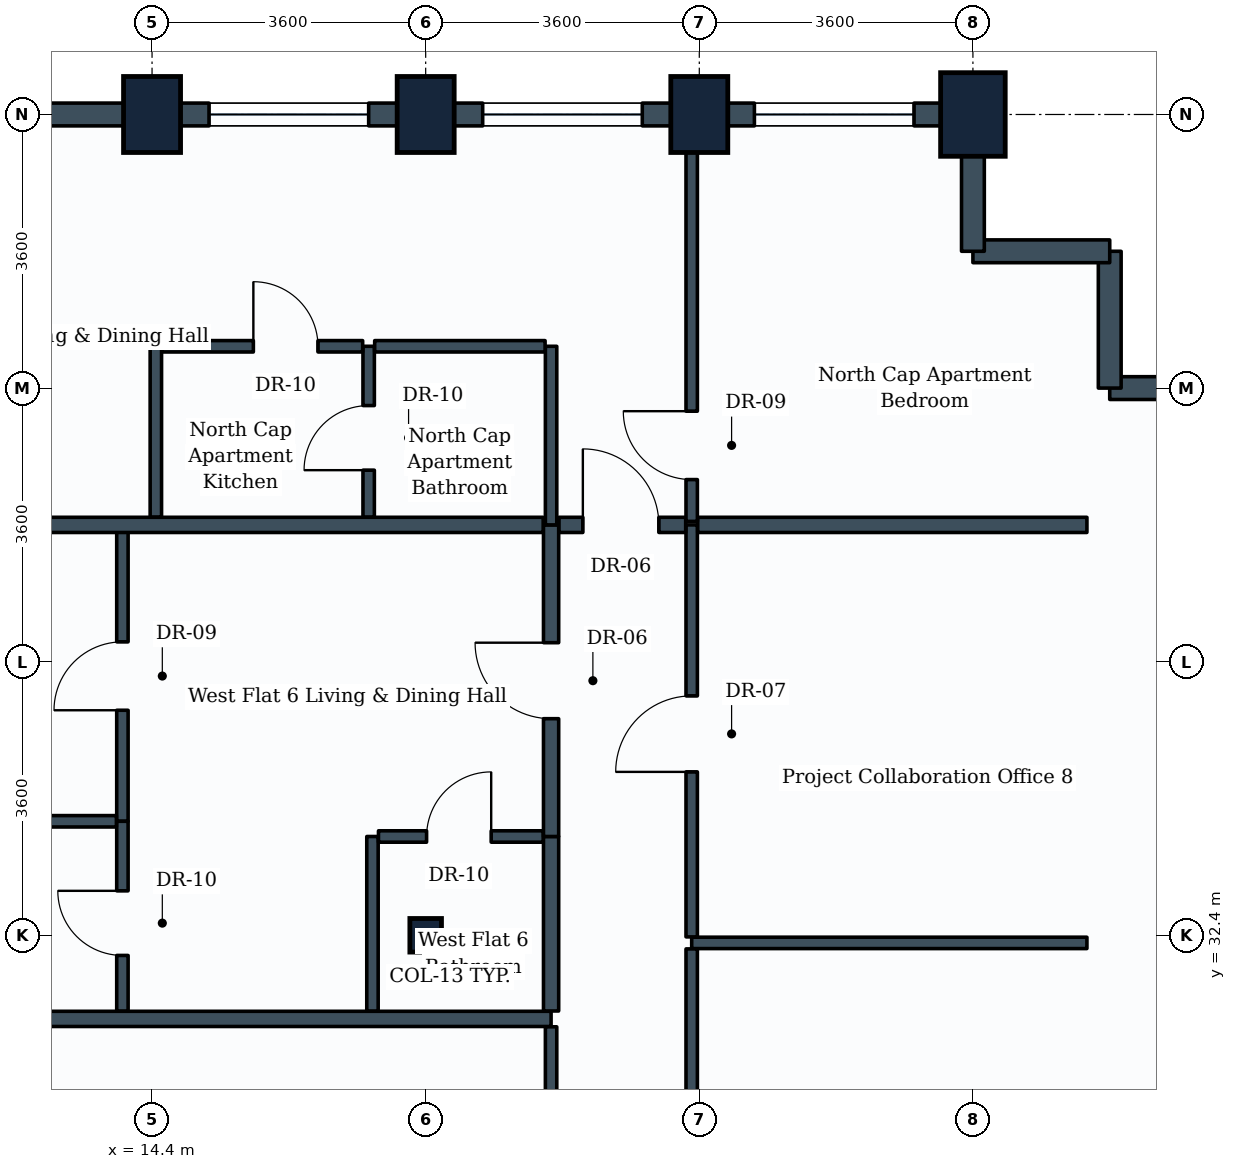
"""IFC4 building model, lengths in metres.
Left out: names, types, materials, properties, quantities, classifications, styles, units other than length and angle.
Written with IfcOpenShell. Run it as: python <this file> out.ifc"""

import sys

from ifc_helpers import new_model, si_unit, direction, frame, frame_2d, origin, origin_2d, place, context, subcontext, project, spatial, rectangle, i_section, extrude, element, fill, save


model = new_model("IFC4")
c1 = context("Model", 3, precision=1e-05, world=origin(), true_north=direction((0.0, 1.0)))
c2 = subcontext(c1, "Body", "Model", "MODEL_VIEW")
j1 = project(units=[si_unit("LENGTHUNIT", "METRE"), si_unit("PLANEANGLEUNIT", "RADIAN")], contexts=[c1])
p1 = place(None, origin())
s1 = spatial("IfcSite", under=j1, at=p1, CompositionType="ELEMENT")
p2 = place(p1, origin())
s2 = spatial("IfcBuilding", under=s1, at=p2, CompositionType="ELEMENT")
p3 = place(p2, frame((0.0, 0.0, 146.6)))
s3 = spatial("IfcBuildingStorey", under=s2, at=p3, CompositionType="ELEMENT", Elevation=146.6)
p4 = place(p3, frame((14.4, 43.2, 0.0), z_axis=(0.0, 0.0, 1.0), x_axis=(1.0, 0.0, 0.0)))
e1 = element("IfcColumn", 1, at=p4, inside=s3, PredefinedType="COLUMN", context=c2, shape_type="SweptSolid", body=[
    extrude(rectangle(XDim=0.75, YDim=1.0, at=origin_2d()), origin(), (0.0, 0.0, 1.0), 3.8),
])
p5 = place(p3, frame((18.0, 32.4, 0.0), z_axis=(0.0, 0.0, 1.0), x_axis=(1.0, 0.0, 0.0)))
e2 = element("IfcColumn", 2, at=p5, inside=s3, PredefinedType="COLUMN", context=c2, shape_type="SweptSolid", body=[
    extrude(i_section(OverallWidth=0.416, OverallDepth=0.442, WebThickness=0.025, FlangeThickness=0.041, FilletRadius=0.015, at=origin_2d()), origin(), (0.0, 0.0, 1.0), 3.8),
])
for number, where, z_axis, x_axis in (
    (3, (18.0, 43.2, 0.0), (0.0, 0.0, 1.0), (1.0, 0.0, 0.0)),
    (4, (21.6, 43.2, 0.0), (0.0, 0.0, 1.0), (1.0, 0.0, 0.0)),
):
    element("IfcColumn", number, at=place(p3, frame(where, z_axis=z_axis, x_axis=x_axis)), inside=s3, PredefinedType="COLUMN", context=c2, shape_type="SweptSolid", body=[
        extrude(rectangle(XDim=0.75, YDim=1.0, at=origin_2d()), origin(), (0.0, 0.0, 1.0), 3.8),
    ])
p6 = place(p3, frame((25.2, 43.2, 0.0), z_axis=(0.0, 0.0, 1.0), x_axis=(1.0, 0.0, 0.0)))
e5 = element("IfcColumn", 5, at=p6, inside=s3, PredefinedType="COLUMN", context=c2, shape_type="SweptSolid", body=[
    extrude(rectangle(XDim=0.85, YDim=1.1, at=origin_2d()), origin(), (0.0, 0.0, 1.0), 3.8),
])
p7 = place(p3, frame((27.0, 39.6, 0.0), z_axis=(0.0, 0.0, 1.0), x_axis=(1.0, 0.0, 0.0)))
e6 = element("IfcWall", 6, at=p7, inside=s3, PredefinedType="STANDARD", context=c2, shape_type="SweptSolid", body=[
    extrude(rectangle(XDim=1.8, YDim=0.3, at=frame_2d((0.9, 0.0))), origin(), (0.0, 0.0, 1.0), 2.93),
])
p8 = place(p3, frame((27.0, 39.6, 0.0), z_axis=(0.0, 0.0, 1.0), x_axis=(0.0, 1.0, 0.0)))
e7 = element("IfcWall", 7, at=p8, inside=s3, PredefinedType="STANDARD", context=c2, shape_type="SweptSolid", body=[
    extrude(rectangle(XDim=1.8, YDim=0.3, at=frame_2d((0.9, 0.0))), origin(), (0.0, 0.0, 1.0), 3.535),
])
p9 = place(p3, frame((25.2, 41.4, 0.0), z_axis=(0.0, 0.0, 1.0), x_axis=(1.0, 0.0, 0.0)))
e8 = element("IfcWall", 8, at=p9, inside=s3, PredefinedType="STANDARD", context=c2, shape_type="SweptSolid", body=[
    extrude(rectangle(XDim=1.8, YDim=0.3, at=frame_2d((0.9, 0.0))), origin(), (0.0, 0.0, 1.0), 3.535),
])
p10 = place(p3, frame((25.2, 41.4, 0.0), z_axis=(0.0, 0.0, 1.0), x_axis=(0.0, 1.0, 0.0)))
e9 = element("IfcWall", 9, at=p10, inside=s3, PredefinedType="STANDARD", context=c2, shape_type="SweptSolid", body=[
    extrude(rectangle(XDim=1.8, YDim=0.3, at=frame_2d((0.9, 0.0))), origin(), (0.0, 0.0, 1.0), 2.93),
])
p11 = place(p3, frame((21.6, 43.2, 0.0), z_axis=(0.0, 0.0, 1.0), x_axis=(1.0, 0.0, 0.0)))
e10 = element("IfcWall", 10, at=p11, inside=s3, PredefinedType="STANDARD", context=c2, shape_type="SweptSolid", body=[
    extrude(rectangle(XDim=3.6, YDim=0.3, at=frame_2d((1.8, 0.0))), origin(), (0.0, 0.0, 1.0), 2.93),
])
p12 = place(p11, frame((0.725, 0.0, 0.85)))
e11 = element("IfcOpeningElement", 11, at=p12, cuts=e10, PredefinedType="OPENING", context=c2, shape_type="SweptSolid", body=[
    extrude(rectangle(XDim=2.1, YDim=1.35, at=frame_2d((1.05, 0.675))), frame((0.0, 0.16, 0.0), z_axis=(0.0, -1.0, 0.0), x_axis=(1.0, 0.0, 0.0)), (0.0, 0.0, 1.0), 0.32),
])
p13 = place(p3, frame((18.0, 43.2, 0.0), z_axis=(0.0, 0.0, 1.0), x_axis=(1.0, 0.0, 0.0)))
e12 = element("IfcWall", 12, at=p13, inside=s3, PredefinedType="STANDARD", context=c2, shape_type="SweptSolid", body=[
    extrude(rectangle(XDim=3.6, YDim=0.3, at=frame_2d((1.8, 0.0))), origin(), (0.0, 0.0, 1.0), 2.93),
])
p14 = place(p13, frame((0.75, 0.0, 0.85)))
e13 = element("IfcOpeningElement", 13, at=p14, cuts=e12, PredefinedType="OPENING", context=c2, shape_type="SweptSolid", body=[
    extrude(rectangle(XDim=2.1, YDim=1.35, at=frame_2d((1.05, 0.675))), frame((0.0, 0.16, 0.0), z_axis=(0.0, -1.0, 0.0), x_axis=(1.0, 0.0, 0.0)), (0.0, 0.0, 1.0), 0.32),
])
p15 = place(p3, frame((14.4, 43.2, 0.0), z_axis=(0.0, 0.0, 1.0), x_axis=(1.0, 0.0, 0.0)))
e14 = element("IfcWall", 14, at=p15, inside=s3, PredefinedType="STANDARD", context=c2, shape_type="SweptSolid", body=[
    extrude(rectangle(XDim=3.6, YDim=0.3, at=frame_2d((1.8, 0.0))), origin(), (0.0, 0.0, 1.0), 2.93),
])
p16 = place(p15, frame((0.75, 0.0, 0.85)))
e15 = element("IfcOpeningElement", 15, at=p16, cuts=e14, PredefinedType="OPENING", context=c2, shape_type="SweptSolid", body=[
    extrude(rectangle(XDim=2.1, YDim=1.35, at=frame_2d((1.05, 0.675))), frame((0.0, 0.16, 0.0), z_axis=(0.0, -1.0, 0.0), x_axis=(1.0, 0.0, 0.0)), (0.0, 0.0, 1.0), 0.32),
])
p17 = place(p3, frame((10.8, 43.2, 0.0), z_axis=(0.0, 0.0, 1.0), x_axis=(1.0, 0.0, 0.0)))
e16 = element("IfcWall", 16, at=p17, inside=s3, PredefinedType="STANDARD", context=c2, shape_type="SweptSolid", body=[
    extrude(rectangle(XDim=3.6, YDim=0.3, at=frame_2d((1.8, 0.0))), origin(), (0.0, 0.0, 1.0), 2.93),
])
p18 = place(p3, frame((7.354, 31.3, 0.0), z_axis=(0.0, 0.0, 1.0), x_axis=(1.0, 0.0, 0.0)))
e17 = element("IfcWall", 17, at=p18, inside=s3, PredefinedType="PARTITIONING", context=c2, shape_type="SweptSolid", body=[
    extrude(rectangle(XDim=12.296, YDim=0.2, at=frame_2d((6.148, 0.0))), origin(), (0.0, 0.0, 1.0), 2.93),
])
p19 = place(p3, frame((19.65, 26.904, 0.0), z_axis=(0.0, 0.0, 1.0), x_axis=(0.0, 1.0, 0.0)))
e18 = element("IfcWall", 18, at=p19, inside=s3, PredefinedType="PARTITIONING", context=c2, shape_type="SweptSolid", body=[
    extrude(rectangle(XDim=4.292, YDim=0.15, at=frame_2d((2.146, 0.0))), origin(), (0.0, 0.0, 1.0), 3.17),
])
p20 = place(p19, frame((1.606, 0.0, 0.0)))
e19 = element("IfcOpeningElement", 19, at=p20, cuts=e18, PredefinedType="OPENING", context=c2, shape_type="SweptSolid", body=[
    extrude(rectangle(XDim=1.0, YDim=2.1, at=frame_2d((0.5, 1.05))), frame((0.0, 0.085, 0.0), z_axis=(0.0, -1.0, 0.0), x_axis=(1.0, 0.0, 0.0)), (0.0, 0.0, 1.0), 0.17),
])
p21 = place(p3, frame((19.65, 31.404, 0.0), z_axis=(0.0, 0.0, 1.0), x_axis=(0.0, 1.0, 0.0)))
e20 = element("IfcWall", 20, at=p21, inside=s3, PredefinedType="PARTITIONING", context=c2, shape_type="SweptSolid", body=[
    extrude(rectangle(XDim=2.296, YDim=0.2, at=frame_2d((1.148, 0.0))), origin(), (0.0, 0.0, 1.0), 3.18),
])
p22 = place(p3, frame((17.3, 31.404, 0.0), z_axis=(0.0, 0.0, 1.0), x_axis=(0.0, 1.0, 0.0)))
e21 = element("IfcWall", 21, at=p22, inside=s3, PredefinedType="PARTITIONING", context=c2, shape_type="SweptSolid", body=[
    extrude(rectangle(XDim=2.296, YDim=0.15, at=frame_2d((1.148, 0.0))), origin(), (0.0, 0.0, 1.0), 3.18),
])
p23 = place(p3, frame((17.379, 33.7, 0.0), z_axis=(0.0, 0.0, 1.0), x_axis=(1.0, 0.0, 0.0)))
e22 = element("IfcWall", 22, at=p23, inside=s3, PredefinedType="PARTITIONING", context=c2, shape_type="SweptSolid", body=[
    extrude(rectangle(XDim=2.167, YDim=0.15, at=frame_2d((1.083, 0.0))), origin(), (0.0, 0.0, 1.0), 3.17),
])
p24 = place(p23, frame((0.633, 0.0, 0.0)))
e23 = element("IfcOpeningElement", 23, at=p24, cuts=e22, PredefinedType="OPENING", context=c2, shape_type="SweptSolid", body=[
    extrude(rectangle(XDim=0.85, YDim=2.1, at=frame_2d((0.425, 1.05))), frame((0.0, 0.085, 0.0), z_axis=(0.0, -1.0, 0.0), x_axis=(1.0, 0.0, 0.0)), (0.0, 0.0, 1.0), 0.17),
])
p25 = place(p3, frame((19.65, 33.7, 0.0), z_axis=(0.0, 0.0, 1.0), x_axis=(0.0, 1.0, 0.0)))
e24 = element("IfcWall", 24, at=p25, inside=s3, PredefinedType="PARTITIONING", context=c2, shape_type="SweptSolid", body=[
    extrude(rectangle(XDim=4.1, YDim=0.2, at=frame_2d((2.05, 0.0))), origin(), (0.0, 0.0, 1.0), 3.17),
])
p26 = place(p25, frame((1.55, 0.0, 0.0)))
e25 = element("IfcOpeningElement", 25, at=p26, cuts=e24, PredefinedType="OPENING", context=c2, shape_type="SweptSolid", body=[
    extrude(rectangle(XDim=1.0, YDim=2.1, at=frame_2d((0.5, 1.05))), frame((0.0, 0.11, 0.0), z_axis=(0.0, -1.0, 0.0), x_axis=(1.0, 0.0, 0.0)), (0.0, 0.0, 1.0), 0.22),
])
p27 = place(p3, frame((14.01, 33.9, 0.0), z_axis=(0.0, 0.0, 1.0), x_axis=(0.0, 1.0, 0.0)))
e26 = element("IfcWall", 26, at=p27, inside=s3, PredefinedType="PARTITIONING", context=c2, shape_type="SweptSolid", body=[
    extrude(rectangle(XDim=3.9, YDim=0.15, at=frame_2d((1.95, 0.0))), origin(), (0.0, 0.0, 1.0), 3.17),
])
p28 = place(p27, frame((1.461, 0.0, 0.0)))
e27 = element("IfcOpeningElement", 27, at=p28, cuts=e26, PredefinedType="OPENING", context=c2, shape_type="SweptSolid", body=[
    extrude(rectangle(XDim=0.9, YDim=2.1, at=frame_2d((0.45, 1.05))), frame((0.0, 0.085, 0.0), z_axis=(0.0, -1.0, 0.0), x_axis=(1.0, 0.0, 0.0)), (0.0, 0.0, 1.0), 0.17),
])
p29 = place(p3, frame((14.01, 31.404, 0.0), z_axis=(0.0, 0.0, 1.0), x_axis=(0.0, 1.0, 0.0)))
e28 = element("IfcWall", 28, at=p29, inside=s3, PredefinedType="PARTITIONING", context=c2, shape_type="SweptSolid", body=[
    extrude(rectangle(XDim=2.496, YDim=0.15, at=frame_2d((1.248, 0.0))), origin(), (0.0, 0.0, 1.0), 3.18),
])
p30 = place(p29, frame((0.731, 0.0, 0.0)))
e29 = element("IfcOpeningElement", 29, at=p30, cuts=e28, PredefinedType="OPENING", context=c2, shape_type="SweptSolid", body=[
    extrude(rectangle(XDim=0.85, YDim=2.1, at=frame_2d((0.425, 1.05))), frame((0.0, 0.085, 0.0), z_axis=(0.0, -1.0, 0.0), x_axis=(1.0, 0.0, 0.0)), (0.0, 0.0, 1.0), 0.17),
])
p31 = place(p3, frame((7.354, 33.9, 0.0), z_axis=(0.0, 0.0, 1.0), x_axis=(1.0, 0.0, 0.0)))
e30 = element("IfcWall", 30, at=p31, inside=s3, PredefinedType="PARTITIONING", context=c2, shape_type="SweptSolid", body=[
    extrude(rectangle(XDim=6.577, YDim=0.15, at=frame_2d((3.289, 0.0))), origin(), (0.0, 0.0, 1.0), 2.93),
])
p32 = place(p3, frame((21.5, 32.3, 0.0), z_axis=(0.0, 0.0, 1.0), x_axis=(1.0, 0.0, 0.0)))
e31 = element("IfcWall", 31, at=p32, inside=s3, PredefinedType="PARTITIONING", context=c2, shape_type="SweptSolid", body=[
    extrude(rectangle(XDim=5.2, YDim=0.15, at=frame_2d((2.6, 0.0))), origin(), (0.0, 0.0, 1.0), 3.18),
])
p33 = place(p3, frame((21.5, 26.879, 0.0), z_axis=(0.0, 0.0, 1.0), x_axis=(0.0, 1.0, 0.0)))
e32 = element("IfcWall", 32, at=p33, inside=s3, PredefinedType="PARTITIONING", context=c2, shape_type="SweptSolid", body=[
    extrude(rectangle(XDim=5.342, YDim=0.15, at=frame_2d((2.671, 0.0))), origin(), (0.0, 0.0, 1.0), 3.13),
])
p34 = place(p33, frame((2.171, 0.0, 0.0)))
e33 = element("IfcOpeningElement", 33, at=p34, cuts=e32, PredefinedType="OPENING", context=c2, shape_type="SweptSolid", body=[
    extrude(rectangle(XDim=1.0, YDim=2.1, at=frame_2d((0.5, 1.05))), frame((0.0, 0.085, 0.0), z_axis=(0.0, -1.0, 0.0), x_axis=(1.0, 0.0, 0.0)), (0.0, 0.0, 1.0), 0.17),
])
p35 = place(p3, frame((21.5, 32.379, 0.0), z_axis=(0.0, 0.0, 1.0), x_axis=(0.0, 1.0, 0.0)))
e34 = element("IfcWall", 34, at=p35, inside=s3, PredefinedType="PARTITIONING", context=c2, shape_type="SweptSolid", body=[
    extrude(rectangle(XDim=5.421, YDim=0.15, at=frame_2d((2.71, 0.0))), origin(), (0.0, 0.0, 1.0), 3.17),
])
p36 = place(p35, frame((2.171, 0.0, 0.0)))
e35 = element("IfcOpeningElement", 35, at=p36, cuts=e34, PredefinedType="OPENING", context=c2, shape_type="SweptSolid", body=[
    extrude(rectangle(XDim=1.0, YDim=2.1, at=frame_2d((0.5, 1.05))), frame((0.0, 0.085, 0.0), z_axis=(0.0, -1.0, 0.0), x_axis=(1.0, 0.0, 0.0)), (0.0, 0.0, 1.0), 0.17),
])
p37 = place(p3, frame((7.354, 37.8, 0.0), z_axis=(0.0, 0.0, 1.0), x_axis=(1.0, 0.0, 0.0)))
e36 = element("IfcWall", 36, at=p37, inside=s3, PredefinedType="PARTITIONING", context=c2, shape_type="SweptSolid", body=[
    extrude(rectangle(XDim=12.192, YDim=0.2, at=frame_2d((6.096, 0.0))), origin(), (0.0, 0.0, 1.0), 2.93),
])
p38 = place(p3, frame((21.579, 37.8, 0.0), z_axis=(0.0, 0.0, 1.0), x_axis=(1.0, 0.0, 0.0)))
e37 = element("IfcWall", 37, at=p38, inside=s3, PredefinedType="PARTITIONING", context=c2, shape_type="SweptSolid", body=[
    extrude(rectangle(XDim=5.121, YDim=0.2, at=frame_2d((2.561, 0.0))), origin(), (0.0, 0.0, 1.0), 3.535),
])
p39 = place(p3, frame((19.754, 37.8, 0.0), z_axis=(0.0, 0.0, 1.0), x_axis=(1.0, 0.0, 0.0)))
e38 = element("IfcWall", 38, at=p39, inside=s3, PredefinedType="PARTITIONING", context=c2, shape_type="SweptSolid", body=[
    extrude(rectangle(XDim=1.667, YDim=0.2, at=frame_2d((0.833, 0.0))), origin(), (0.0, 0.0, 1.0), 3.535),
])
p40 = place(p39, frame((0.314, 0.0, 0.0)))
e39 = element("IfcOpeningElement", 39, at=p40, cuts=e38, PredefinedType="OPENING", context=c2, shape_type="SweptSolid", body=[
    extrude(rectangle(XDim=1.0, YDim=2.1, at=frame_2d((0.5, 1.05))), frame((0.0, 0.11, 0.0), z_axis=(0.0, -1.0, 0.0), x_axis=(1.0, 0.0, 0.0)), (0.0, 0.0, 1.0), 0.22),
])
p41 = place(p3, frame((19.65, 37.8, 0.0), z_axis=(0.0, 0.0, 1.0), x_axis=(0.0, 1.0, 0.0)))
e40 = element("IfcWall", 40, at=p41, inside=s3, PredefinedType="PARTITIONING", context=c2, shape_type="SweptSolid", body=[
    extrude(rectangle(XDim=2.35, YDim=0.15, at=frame_2d((1.175, 0.0))), origin(), (0.0, 0.0, 1.0), 3.535),
])
p42 = place(p3, frame((17.25, 37.904, 0.0), z_axis=(0.0, 0.0, 1.0), x_axis=(0.0, 1.0, 0.0)))
e41 = element("IfcWall", 41, at=p42, inside=s3, PredefinedType="PARTITIONING", context=c2, shape_type="SweptSolid", body=[
    extrude(rectangle(XDim=2.246, YDim=0.15, at=frame_2d((1.123, 0.0))), origin(), (0.0, 0.0, 1.0), 3.535),
])
p43 = place(p42, frame((0.616, 0.0, 0.0)))
e42 = element("IfcOpeningElement", 42, at=p43, cuts=e41, PredefinedType="OPENING", context=c2, shape_type="SweptSolid", body=[
    extrude(rectangle(XDim=0.85, YDim=2.1, at=frame_2d((0.425, 1.05))), frame((0.0, 0.085, 0.0), z_axis=(0.0, -1.0, 0.0), x_axis=(1.0, 0.0, 0.0)), (0.0, 0.0, 1.0), 0.17),
])
p44 = place(p3, frame((17.329, 40.15, 0.0), z_axis=(0.0, 0.0, 1.0), x_axis=(1.0, 0.0, 0.0)))
e43 = element("IfcWall", 43, at=p44, inside=s3, PredefinedType="PARTITIONING", context=c2, shape_type="SweptSolid", body=[
    extrude(rectangle(XDim=2.242, YDim=0.15, at=frame_2d((1.121, 0.0))), origin(), (0.0, 0.0, 1.0), 3.17),
])
p45 = place(p3, frame((21.5, 37.846, 0.0), z_axis=(0.0, 0.0, 1.0), x_axis=(0.0, 1.0, 0.0)))
e44 = element("IfcWall", 44, at=p45, inside=s3, PredefinedType="PARTITIONING", context=c2, shape_type="SweptSolid", body=[
    extrude(rectangle(XDim=5.2, YDim=0.15, at=frame_2d((2.6, 0.0))), origin(), (0.0, 0.0, 1.0), 2.93),
])
p46 = place(p45, frame((0.55, 0.0, 0.0)))
e45 = element("IfcOpeningElement", 45, at=p46, cuts=e44, PredefinedType="OPENING", context=c2, shape_type="SweptSolid", body=[
    extrude(rectangle(XDim=0.9, YDim=2.1, at=frame_2d((0.45, 1.05))), frame((0.0, 0.085, 0.0), z_axis=(0.0, -1.0, 0.0), x_axis=(1.0, 0.0, 0.0)), (0.0, 0.0, 1.0), 0.17),
])
p47 = place(p3, frame((14.45, 37.904, 0.0), z_axis=(0.0, 0.0, 1.0), x_axis=(0.0, 1.0, 0.0)))
e46 = element("IfcWall", 46, at=p47, inside=s3, PredefinedType="PARTITIONING", context=c2, shape_type="SweptSolid", body=[
    extrude(rectangle(XDim=2.246, YDim=0.15, at=frame_2d((1.123, 0.0))), origin(), (0.0, 0.0, 1.0), 3.535),
])
p48 = place(p3, frame((14.529, 40.15, 0.0), z_axis=(0.0, 0.0, 1.0), x_axis=(1.0, 0.0, 0.0)))
e47 = element("IfcWall", 47, at=p48, inside=s3, PredefinedType="PARTITIONING", context=c2, shape_type="SweptSolid", body=[
    extrude(rectangle(XDim=2.642, YDim=0.15, at=frame_2d((1.321, 0.0))), origin(), (0.0, 0.0, 1.0), 3.535),
])
p49 = place(p48, frame((1.204, 0.0, 0.0)))
e48 = element("IfcOpeningElement", 48, at=p49, cuts=e47, PredefinedType="OPENING", context=c2, shape_type="SweptSolid", body=[
    extrude(rectangle(XDim=0.85, YDim=2.1, at=frame_2d((0.425, 1.05))), frame((0.0, 0.085, 0.0), z_axis=(0.0, -1.0, 0.0), x_axis=(1.0, 0.0, 0.0)), (0.0, 0.0, 1.0), 0.17),
])
p50 = place(p12, origin())
e49 = element("IfcWindow", 49, at=p50, inside=s3, PartitioningType="SINGLE_PANEL", PredefinedType="WINDOW", context=c2, shape_type="SweptSolid", body=[
    extrude(rectangle(XDim=2.1, YDim=1.35, at=frame_2d((1.05, 0.675))), frame((0.0, 0.03, 0.0), z_axis=(0.0, -1.0, 0.0), x_axis=(1.0, 0.0, 0.0)), (0.0, 0.0, 1.0), 0.06),
])
fill(e11, e49)
p51 = place(p14, origin())
e50 = element("IfcWindow", 50, at=p51, inside=s3, PartitioningType="SINGLE_PANEL", PredefinedType="WINDOW", context=c2, shape_type="SweptSolid", body=[
    extrude(rectangle(XDim=2.1, YDim=1.35, at=frame_2d((1.05, 0.675))), frame((0.0, 0.03, 0.0), z_axis=(0.0, -1.0, 0.0), x_axis=(1.0, 0.0, 0.0)), (0.0, 0.0, 1.0), 0.06),
])
fill(e13, e50)
p52 = place(p16, origin())
e51 = element("IfcWindow", 51, at=p52, inside=s3, PartitioningType="SINGLE_PANEL", PredefinedType="WINDOW", context=c2, shape_type="SweptSolid", body=[
    extrude(rectangle(XDim=2.1, YDim=1.35, at=frame_2d((1.05, 0.675))), frame((0.0, 0.03, 0.0), z_axis=(0.0, -1.0, 0.0), x_axis=(1.0, 0.0, 0.0)), (0.0, 0.0, 1.0), 0.06),
])
fill(e15, e51)
p53 = place(p24, origin())
e52 = element("IfcDoor", 52, at=p53, inside=s3, OperationType="SINGLE_SWING_RIGHT", PredefinedType="DOOR", context=c2, shape_type="SweptSolid", body=[
    extrude(rectangle(XDim=0.85, YDim=2.1, at=frame_2d((0.425, 1.05))), frame((0.0, 0.025, 0.0), z_axis=(0.0, -1.0, 0.0), x_axis=(1.0, 0.0, 0.0)), (0.0, 0.0, 1.0), 0.05),
])
fill(e23, e52)
p54 = place(p26, origin())
e53 = element("IfcDoor", 53, at=p54, inside=s3, OperationType="SINGLE_SWING_RIGHT", PredefinedType="DOOR", context=c2, shape_type="SweptSolid", body=[
    extrude(rectangle(XDim=1.0, YDim=2.1, at=frame_2d((0.5, 1.05))), frame((0.0, 0.025, 0.0), z_axis=(0.0, -1.0, 0.0), x_axis=(1.0, 0.0, 0.0)), (0.0, 0.0, 1.0), 0.05),
])
fill(e25, e53)
p55 = place(p28, origin())
e54 = element("IfcDoor", 54, at=p55, inside=s3, OperationType="SINGLE_SWING_LEFT", PredefinedType="DOOR", context=c2, shape_type="SweptSolid", body=[
    extrude(rectangle(XDim=0.9, YDim=2.1, at=frame_2d((0.45, 1.05))), frame((0.0, 0.025, 0.0), z_axis=(0.0, -1.0, 0.0), x_axis=(1.0, 0.0, 0.0)), (0.0, 0.0, 1.0), 0.05),
])
fill(e27, e54)
p56 = place(p30, origin())
e55 = element("IfcDoor", 55, at=p56, inside=s3, OperationType="SINGLE_SWING_RIGHT", PredefinedType="DOOR", context=c2, shape_type="SweptSolid", body=[
    extrude(rectangle(XDim=0.85, YDim=2.1, at=frame_2d((0.425, 1.05))), frame((0.0, 0.025, 0.0), z_axis=(0.0, -1.0, 0.0), x_axis=(1.0, 0.0, 0.0)), (0.0, 0.0, 1.0), 0.05),
])
fill(e29, e55)
p57 = place(p36, origin())
e56 = element("IfcDoor", 56, at=p57, inside=s3, OperationType="SINGLE_SWING_LEFT", PredefinedType="DOOR", context=c2, shape_type="SweptSolid", body=[
    extrude(rectangle(XDim=1.0, YDim=2.1, at=frame_2d((0.5, 1.05))), frame((0.0, 0.025, 0.0), z_axis=(0.0, -1.0, 0.0), x_axis=(1.0, 0.0, 0.0)), (0.0, 0.0, 1.0), 0.05),
])
fill(e35, e56)
p58 = place(p40, origin())
e57 = element("IfcDoor", 57, at=p58, inside=s3, OperationType="SINGLE_SWING_LEFT", PredefinedType="DOOR", context=c2, shape_type="SweptSolid", body=[
    extrude(rectangle(XDim=1.0, YDim=2.1, at=frame_2d((0.5, 1.05))), frame((0.0, 0.025, 0.0), z_axis=(0.0, -1.0, 0.0), x_axis=(1.0, 0.0, 0.0)), (0.0, 0.0, 1.0), 0.05),
])
fill(e39, e57)
p59 = place(p43, origin())
e58 = element("IfcDoor", 58, at=p59, inside=s3, OperationType="SINGLE_SWING_LEFT", PredefinedType="DOOR", context=c2, shape_type="SweptSolid", body=[
    extrude(rectangle(XDim=0.85, YDim=2.1, at=frame_2d((0.425, 1.05))), frame((0.0, 0.025, 0.0), z_axis=(0.0, -1.0, 0.0), x_axis=(1.0, 0.0, 0.0)), (0.0, 0.0, 1.0), 0.05),
])
fill(e42, e58)
p60 = place(p46, origin())
e59 = element("IfcDoor", 59, at=p60, inside=s3, OperationType="SINGLE_SWING_RIGHT", PredefinedType="DOOR", context=c2, shape_type="SweptSolid", body=[
    extrude(rectangle(XDim=0.9, YDim=2.1, at=frame_2d((0.45, 1.05))), frame((0.0, 0.025, 0.0), z_axis=(0.0, -1.0, 0.0), x_axis=(1.0, 0.0, 0.0)), (0.0, 0.0, 1.0), 0.05),
])
fill(e45, e59)
p61 = place(p49, origin())
e60 = element("IfcDoor", 60, at=p61, inside=s3, OperationType="SINGLE_SWING_LEFT", PredefinedType="DOOR", context=c2, shape_type="SweptSolid", body=[
    extrude(rectangle(XDim=0.85, YDim=2.1, at=frame_2d((0.425, 1.05))), frame((0.0, 0.025, 0.0), z_axis=(0.0, -1.0, 0.0), x_axis=(1.0, 0.0, 0.0)), (0.0, 0.0, 1.0), 0.05),
])
fill(e48, e60)
save(model, sys.argv[1])
